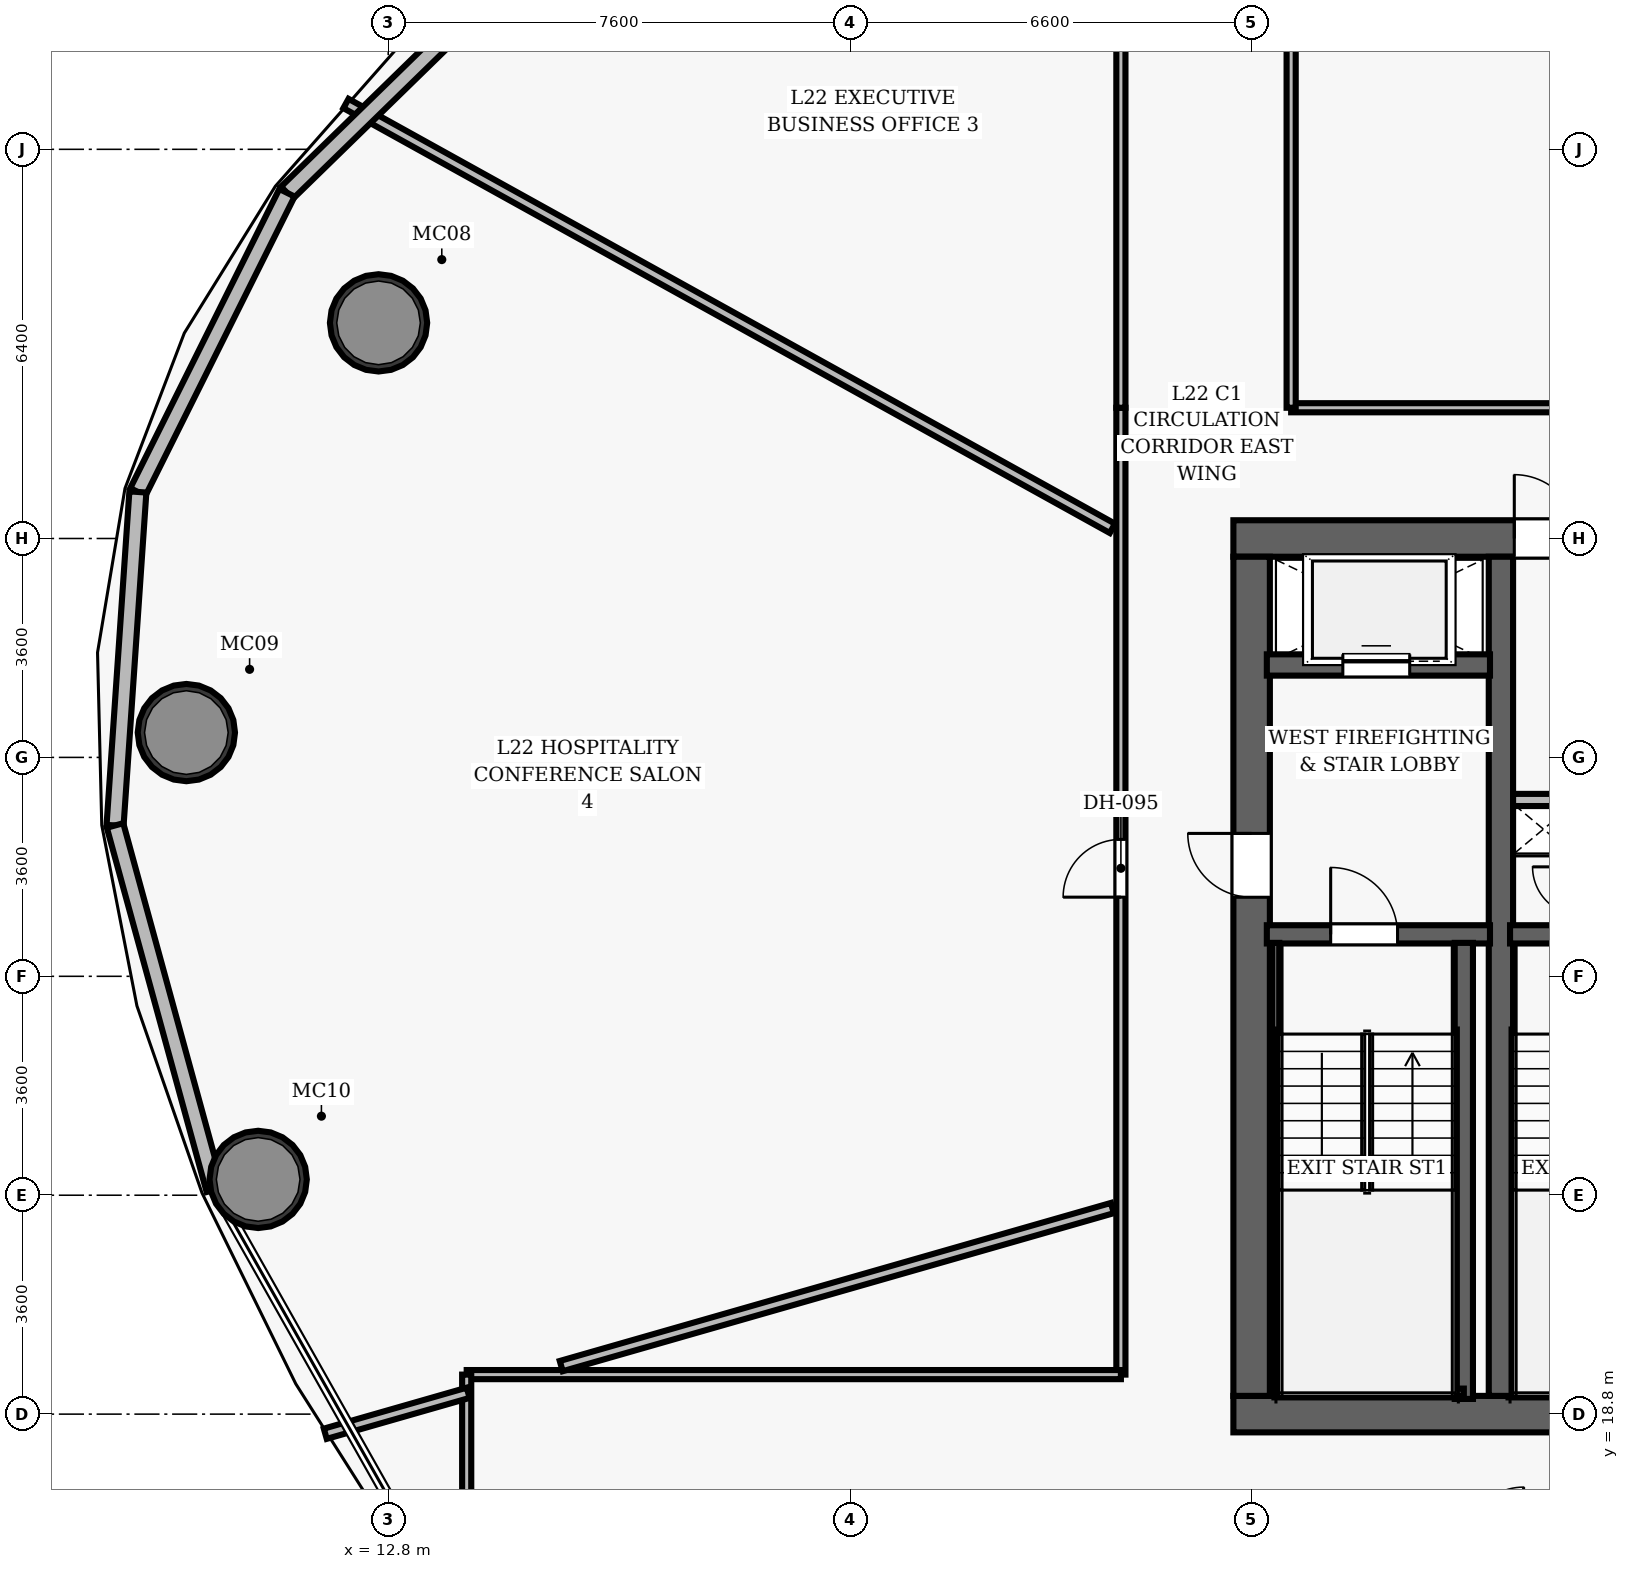
"""IFC4 building model, lengths in metres.
Left out: names, types, materials, properties, quantities, classifications, styles, units other than length and angle.
Written with IfcOpenShell. Run it as: python <this file> out.ifc"""

import sys

from ifc_helpers import new_model, si_unit, direction, frame, frame_2d, origin, origin_2d, place, context, subcontext, project, spatial, rectangle, hollow_circle, extrude, element, fill, save


model = new_model("IFC4")
c1 = context("Model", 3, precision=1e-05, world=origin(), true_north=direction((0.0, 1.0)))
c2 = subcontext(c1, "Body", "Model", "MODEL_VIEW")
j1 = project(units=[si_unit("LENGTHUNIT", "METRE"), si_unit("PLANEANGLEUNIT", "RADIAN")], contexts=[c1])
p1 = place(None, origin())
s1 = spatial("IfcSite", under=j1, at=p1, CompositionType="ELEMENT")
p2 = place(p1, origin())
s2 = spatial("IfcBuilding", under=s1, at=p2, CompositionType="ELEMENT")
p3 = place(p2, frame((0.0, 0.0, 93.9)))
s3 = spatial("IfcBuildingStorey", under=s2, at=p3, CompositionType="ELEMENT", Elevation=93.9)
p4 = place(p3, frame((26.7, 18.8, 0.0), z_axis=(0.0, 0.0, 1.0), x_axis=(1.0, 0.0, 0.0)))
e1 = element("IfcWall", 1, at=p4, inside=s3, PredefinedType="SHEAR", context=c2, shape_type="SweptSolid", body=[
    extrude(rectangle(XDim=22.6, YDim=0.6, at=frame_2d((11.3, 0.0))), origin(), (0.0, 0.0, 1.0), 3.5),
])
p5 = place(p4, frame((14.52, 0.0, 0.0)))
e2 = element("IfcOpeningElement", 2, at=p5, cuts=e1, PredefinedType="OPENING", context=c2, shape_type="SweptSolid", body=[
    extrude(rectangle(XDim=1.05, YDim=2.15, at=frame_2d((0.525, 1.075))), frame((0.0, 0.31, 0.0), z_axis=(0.0, -1.0, 0.0), x_axis=(1.0, 0.0, 0.0)), (0.0, 0.0, 1.0), 0.62),
])
p6 = place(p3, frame((26.7, 33.2, 0.0), z_axis=(0.0, 0.0, 1.0), x_axis=(1.0, 0.0, 0.0)))
e3 = element("IfcWall", 3, at=p6, inside=s3, PredefinedType="SHEAR", context=c2, shape_type="SweptSolid", body=[
    extrude(rectangle(XDim=22.6, YDim=0.6, at=frame_2d((11.3, 0.0))), origin(), (0.0, 0.0, 1.0), 3.5),
])
p7 = place(p6, frame((4.62, 0.0, 0.0)))
e4 = element("IfcOpeningElement", 4, at=p7, cuts=e3, PredefinedType="OPENING", context=c2, shape_type="SweptSolid", body=[
    extrude(rectangle(XDim=1.05, YDim=2.15, at=frame_2d((0.525, 1.075))), frame((0.0, 0.31, 0.0), z_axis=(0.0, -1.0, 0.0), x_axis=(1.0, 0.0, 0.0)), (0.0, 0.0, 1.0), 0.62),
])
p8 = place(p6, frame((14.52, 0.0, 0.0)))
e5 = element("IfcOpeningElement", 5, at=p8, cuts=e3, PredefinedType="OPENING", context=c2, shape_type="SweptSolid", body=[
    extrude(rectangle(XDim=1.05, YDim=2.15, at=frame_2d((0.525, 1.075))), frame((0.0, 0.31, 0.0), z_axis=(0.0, -1.0, 0.0), x_axis=(1.0, 0.0, 0.0)), (0.0, 0.0, 1.0), 0.62),
])
p9 = place(p3, frame((27.0, 19.1, 0.0), z_axis=(0.0, 0.0, 1.0), x_axis=(0.0, 1.0, 0.0)))
e6 = element("IfcWall", 6, at=p9, inside=s3, PredefinedType="SHEAR", context=c2, shape_type="SweptSolid", body=[
    extrude(rectangle(XDim=13.8, YDim=0.6, at=frame_2d((6.9, 0.0))), origin(), (0.0, 0.0, 1.0), 3.5),
])
p10 = place(p9, frame((8.2, 0.0, 0.0)))
e7 = element("IfcOpeningElement", 7, at=p10, cuts=e6, PredefinedType="OPENING", context=c2, shape_type="SweptSolid", body=[
    extrude(rectangle(XDim=1.05, YDim=2.15, at=frame_2d((0.525, 1.075))), frame((0.0, 0.31, 0.0), z_axis=(0.0, -1.0, 0.0), x_axis=(1.0, 0.0, 0.0)), (0.0, 0.0, 1.0), 0.62),
])
p11 = place(p3, frame((31.1, 19.1, 0.0), z_axis=(0.0, 0.0, 1.0), x_axis=(0.0, 1.0, 0.0)))
e8 = element("IfcWall", 8, at=p11, inside=s3, PredefinedType="SHEAR", context=c2, shape_type="SweptSolid", body=[
    extrude(rectangle(XDim=13.8, YDim=0.4, at=frame_2d((6.9, 0.0))), origin(), (0.0, 0.0, 1.0), 3.5),
])
for number, where, z_axis, x_axis in (
    (9, (12.641, 36.746, 0.0), (0.0, 0.0, 1.0), (1.0, 0.0, 0.0)),
    (10, (9.48, 30.008, 0.0), (0.0, 0.0, 1.0), (1.0, 0.0, 0.0)),
    (11, (10.661, 22.66, 0.0), (0.0, 0.0, 1.0), (1.0, 0.0, 0.0)),
):
    element("IfcColumn", number, at=place(p3, frame(where, z_axis=z_axis, x_axis=x_axis)), inside=s3, PredefinedType="COLUMN", context=c2, shape_type="SweptSolid", body=[
        extrude(hollow_circle(Radius=0.8, WallThickness=0.06, at=origin_2d()), origin(), (0.0, 0.0, 1.0), 3.5),
    ])
p12 = place(p3, frame((27.25, 26.69, 0.0), z_axis=(0.0, 0.0, 1.0), x_axis=(1.0, 0.0, 0.0)))
e12 = element("IfcWall", 12, at=p12, inside=s3, PredefinedType="SHEAR", context=c2, shape_type="SweptSolid", body=[
    extrude(rectangle(XDim=3.67, YDim=0.3, at=frame_2d((1.835, 0.0))), origin(), (0.0, 0.0, 1.0), 3.5),
])
p13 = place(p12, frame((1.05, 0.0, 0.0)))
e13 = element("IfcOpeningElement", 13, at=p13, cuts=e12, PredefinedType="OPENING", context=c2, shape_type="SweptSolid", body=[
    extrude(rectangle(XDim=1.1, YDim=2.15, at=frame_2d((0.55, 1.075))), frame((0.0, 0.16, 0.0), z_axis=(0.0, -1.0, 0.0), x_axis=(1.0, 0.0, 0.0)), (0.0, 0.0, 1.0), 0.32),
])
p14 = place(p3, frame((30.49, 19.05, 0.0), z_axis=(0.0, 0.0, 1.0), x_axis=(0.0, 1.0, 0.0)))
e14 = element("IfcWall", 14, at=p14, inside=s3, PredefinedType="SHEAR", context=c2, shape_type="SweptSolid", body=[
    extrude(rectangle(XDim=7.5, YDim=0.3, at=frame_2d((3.75, 0.0))), origin(), (0.0, 0.0, 1.0), 3.5),
])
p15 = place(p3, frame((27.395, 19.1, 0.0), z_axis=(0.0, 0.0, 1.0), x_axis=(0.0, 1.0, 0.0)))
e15 = element("IfcWall", 15, at=p15, inside=s3, PredefinedType="SHEAR", context=c2, shape_type="SweptSolid", body=[
    extrude(rectangle(XDim=7.45, YDim=0.12, at=frame_2d((3.725, 0.0))), origin(), (0.0, 0.0, 1.0), 3.5),
])
p16 = place(p3, frame((27.395, 19.16, 0.0), z_axis=(0.0, 0.0, 1.0), x_axis=(1.0, 0.0, 0.0)))
e16 = element("IfcWall", 16, at=p16, inside=s3, PredefinedType="SHEAR", context=c2, shape_type="SweptSolid", body=[
    extrude(rectangle(XDim=3.095, YDim=0.12, at=frame_2d((1.547, 0.0))), origin(), (0.0, 0.0, 1.0), 3.5),
])
p17 = place(p3, frame((27.25, 31.12, 0.0), z_axis=(0.0, 0.0, 1.0), x_axis=(1.0, 0.0, 0.0)))
e17 = element("IfcWall", 17, at=p17, inside=s3, PredefinedType="SHEAR", context=c2, shape_type="SweptSolid", body=[
    extrude(rectangle(XDim=3.67, YDim=0.35, at=frame_2d((1.835, 0.0))), origin(), (0.0, 0.0, 1.0), 2.5),
])
p18 = place(p17, frame((1.25, 0.0, 0.0)))
e18 = element("IfcOpeningElement", 18, at=p18, cuts=e17, PredefinedType="OPENING", context=c2, shape_type="SweptSolid", body=[
    extrude(rectangle(XDim=1.1, YDim=2.15, at=frame_2d((0.55, 1.075))), frame((0.0, 0.185, 0.0), z_axis=(0.0, -1.0, 0.0), x_axis=(1.0, 0.0, 0.0)), (0.0, 0.0, 1.0), 0.37),
])
p19 = place(p3, frame((31.25, 26.69, 0.0), z_axis=(0.0, 0.0, 1.0), x_axis=(1.0, 0.0, 0.0)))
e19 = element("IfcWall", 19, at=p19, inside=s3, PredefinedType="SHEAR", context=c2, shape_type="SweptSolid", body=[
    extrude(rectangle(XDim=3.56, YDim=0.3, at=frame_2d((1.78, 0.0))), origin(), (0.0, 0.0, 1.0), 3.5),
])
p20 = place(p19, frame((1.55, 0.0, 0.0)))
e20 = element("IfcOpeningElement", 20, at=p20, cuts=e19, PredefinedType="OPENING", context=c2, shape_type="SweptSolid", body=[
    extrude(rectangle(XDim=1.1, YDim=2.15, at=frame_2d((0.55, 1.075))), frame((0.0, 0.16, 0.0), z_axis=(0.0, -1.0, 0.0), x_axis=(1.0, 0.0, 0.0)), (0.0, 0.0, 1.0), 0.32),
])
p21 = place(p3, frame((31.3, 19.16, 0.0), z_axis=(0.0, 0.0, 1.0), x_axis=(1.0, 0.0, 0.0)))
e21 = element("IfcWall", 21, at=p21, inside=s3, PredefinedType="SHEAR", context=c2, shape_type="SweptSolid", body=[
    extrude(rectangle(XDim=3.04, YDim=0.12, at=frame_2d((1.52, 0.0))), origin(), (0.0, 0.0, 1.0), 3.5),
])
p22 = place(p3, frame((31.3, 28.9, 0.0), z_axis=(0.0, 0.0, 1.0), x_axis=(1.0, 0.0, 0.0)))
e22 = element("IfcWall", 22, at=p22, inside=s3, PredefinedType="PARTITIONING", context=c2, shape_type="SweptSolid", body=[
    extrude(rectangle(XDim=1.12, YDim=0.2, at=frame_2d((0.56, 0.0))), origin(), (0.0, 0.0, 1.0), 2.5),
])
p23 = place(p3, frame((27.65, 35.35, 0.0), z_axis=(0.0, 0.0, 1.0), x_axis=(1.0, 0.0, 0.0)))
e23 = element("IfcWall", 23, at=p23, inside=s3, PredefinedType="PARTITIONING", context=c2, shape_type="SweptSolid", body=[
    extrude(rectangle(XDim=23.5, YDim=0.15, at=frame_2d((11.75, 0.0))), origin(), (0.0, 0.0, 1.0), 2.5),
])
p24 = place(p23, frame((16.877, 0.0, 0.0)))
e24 = element("IfcOpeningElement", 24, at=p24, cuts=e23, PredefinedType="OPENING", context=c2, shape_type="SweptSolid", body=[
    extrude(rectangle(XDim=0.95, YDim=2.15, at=frame_2d((0.475, 1.075))), frame((0.0, 0.085, 0.0), z_axis=(0.0, -1.0, 0.0), x_axis=(1.0, 0.0, 0.0)), (0.0, 0.0, 1.0), 0.17),
])
p25 = place(p23, frame((9.003, 0.0, 0.0)))
e25 = element("IfcOpeningElement", 25, at=p25, cuts=e23, PredefinedType="OPENING", context=c2, shape_type="SweptSolid", body=[
    extrude(rectangle(XDim=0.95, YDim=2.15, at=frame_2d((0.475, 1.075))), frame((0.0, 0.085, 0.0), z_axis=(0.0, -1.0, 0.0), x_axis=(1.0, 0.0, 0.0)), (0.0, 0.0, 1.0), 0.17),
])
p26 = place(p23, frame((5.473, 0.0, 0.0)))
e26 = element("IfcOpeningElement", 26, at=p26, cuts=e23, PredefinedType="OPENING", context=c2, shape_type="SweptSolid", body=[
    extrude(rectangle(XDim=0.95, YDim=2.15, at=frame_2d((0.475, 1.075))), frame((0.0, 0.085, 0.0), z_axis=(0.0, -1.0, 0.0), x_axis=(1.0, 0.0, 0.0)), (0.0, 0.0, 1.0), 0.17),
])
p27 = place(p3, frame((24.85, 19.45, 0.0), z_axis=(0.0, 0.0, 1.0), x_axis=(0.0, 1.0, 0.0)))
e27 = element("IfcWall", 27, at=p27, inside=s3, PredefinedType="PARTITIONING", context=c2, shape_type="SweptSolid", body=[
    extrude(rectangle(XDim=15.9, YDim=0.15, at=frame_2d((7.95, 0.0))), origin(), (0.0, 0.0, 1.0), 2.5),
])
p28 = place(p27, frame((7.852, 0.0, 0.0)))
e28 = element("IfcOpeningElement", 28, at=p28, cuts=e27, PredefinedType="OPENING", context=c2, shape_type="SweptSolid", body=[
    extrude(rectangle(XDim=0.95, YDim=2.15, at=frame_2d((0.475, 1.075))), frame((0.0, 0.085, 0.0), z_axis=(0.0, -1.0, 0.0), x_axis=(1.0, 0.0, 0.0)), (0.0, 0.0, 1.0), 0.17),
])
p29 = place(p3, frame((14.091, 19.45, 0.0), z_axis=(0.0, 0.0, 1.0), x_axis=(1.0, 0.0, 0.0)))
e29 = element("IfcWall", 29, at=p29, inside=s3, PredefinedType="PARTITIONING", context=c2, shape_type="SweptSolid", body=[
    extrude(rectangle(XDim=10.759, YDim=0.15, at=frame_2d((5.38, 0.0))), origin(), (0.0, 0.0, 1.0), 2.5),
])
p30 = place(p3, frame((14.091, 16.65, 0.0), z_axis=(0.0, 0.0, 1.0), x_axis=(0.0, 1.0, 0.0)))
e30 = element("IfcWall", 30, at=p30, inside=s3, PredefinedType="PARTITIONING", context=c2, shape_type="SweptSolid", body=[
    extrude(rectangle(XDim=2.8, YDim=0.15, at=frame_2d((1.4, 0.0))), origin(), (0.0, 0.0, 1.0), 2.5),
])
for number, where, z_axis, x_axis in (
    (31, (24.85, 35.35, 0.0), (0.0, 0.0, 1.0), (0.0, 1.0, 0.0)),
    (32, (27.65, 35.35, 0.0), (0.0, 0.0, 1.0), (0.0, 1.0, 0.0)),
):
    element("IfcWall", number, at=place(p3, frame(where, z_axis=z_axis, x_axis=x_axis)), inside=s3, PredefinedType="PARTITIONING", context=c2, shape_type="SweptSolid", body=[
        extrude(rectangle(XDim=10.15, YDim=0.15, at=frame_2d((5.075, 0.0))), origin(), (0.0, 0.0, 1.0), 2.5),
    ])
p31 = place(p3, frame((35.279, 35.49, 0.0), z_axis=(0.0, 0.0, 1.0), x_axis=(-0.27563986981, 0.961260975059, 0.0)))
e33 = element("IfcWall", 33, at=p31, inside=s3, PredefinedType="PARTITIONING", context=c2, shape_type="SweptSolid", body=[
    extrude(rectangle(XDim=14.949, YDim=0.175, at=frame_2d((7.475, 0.0))), origin(), (0.0, 0.0, 1.0), 2.5),
])
p32 = place(p3, frame((24.71, 33.367, 0.0), z_axis=(0.0, 0.0, 1.0), x_axis=(-0.874619537092, 0.48480992702, 0.0)))
e34 = element("IfcWall", 34, at=p32, inside=s3, PredefinedType="PARTITIONING", context=c2, shape_type="SweptSolid", body=[
    extrude(rectangle(XDim=14.412, YDim=0.175, at=frame_2d((7.206, 0.0))), origin(), (0.0, 0.0, 1.0), 2.5),
])
p33 = place(p3, frame((24.71, 22.189, 0.0), z_axis=(0.0, 0.0, 1.0), x_axis=(-0.961261668066, -0.275637453019, 0.0)))
e35 = element("IfcWall", 35, at=p33, inside=s3, PredefinedType="PARTITIONING", context=c2, shape_type="SweptSolid", body=[
    extrude(rectangle(XDim=9.429, YDim=0.175, at=frame_2d((4.715, 0.0))), origin(), (0.0, 0.0, 1.0), 2.5),
])
p34 = place(p3, frame((14.115, 19.151, 0.0), z_axis=(0.0, 0.0, 1.0), x_axis=(-0.961267280853, -0.275617878159, 0.0)))
e36 = element("IfcWall", 36, at=p34, inside=s3, PredefinedType="PARTITIONING", context=c2, shape_type="SweptSolid", body=[
    extrude(rectangle(XDim=2.445, YDim=0.175, at=frame_2d((1.222, 0.0))), origin(), (0.0, 0.0, 1.0), 2.5),
])
p35 = place(p3, frame((11.135, 38.885, 0.0), z_axis=(0.0, 0.0, 1.0), x_axis=(0.715932856162, 0.698169138152, 0.0)))
e37 = element("IfcWall", 37, at=p35, inside=s3, PredefinedType="SOLIDWALL", context=c2, shape_type="SweptSolid", body=[
    extrude(rectangle(XDim=6.212, YDim=0.28, at=frame_2d((3.106, 0.0))), origin(), (0.0, 0.0, 1.0), 3.15),
])
p36 = place(p3, frame((8.683, 33.965, 0.0), z_axis=(0.0, 0.0, 1.0), x_axis=(0.446022975925, 0.895021510885, 0.0)))
e38 = element("IfcWall", 38, at=p36, inside=s3, PredefinedType="SOLIDWALL", context=c2, shape_type="SweptSolid", body=[
    extrude(rectangle(XDim=5.497, YDim=0.28, at=frame_2d((2.749, 0.0))), origin(), (0.0, 0.0, 1.0), 3.15),
])
p37 = place(p3, frame((8.308, 28.481, 0.0), z_axis=(0.0, 0.0, 1.0), x_axis=(0.068257968515, 0.997667705067, 0.0)))
e39 = element("IfcWall", 39, at=p37, inside=s3, PredefinedType="SOLIDWALL", context=c2, shape_type="SweptSolid", body=[
    extrude(rectangle(XDim=5.498, YDim=0.28, at=frame_2d((2.749, 0.0))), origin(), (0.0, 0.0, 1.0), 3.15),
])
p38 = place(p3, frame((9.949, 22.49, 0.0), z_axis=(0.0, 0.0, 1.0), x_axis=(-0.264261187707, 0.96445115204, 0.0)))
e40 = element("IfcWall", 40, at=p38, inside=s3, PredefinedType="SOLIDWALL", context=c2, shape_type="SweptSolid", body=[
    extrude(rectangle(XDim=6.212, YDim=0.28, at=frame_2d((3.106, 0.0))), origin(), (0.0, 0.0, 1.0), 3.15),
])
p39 = place(p13, origin())
e41 = element("IfcDoor", 41, at=p39, inside=s3, OperationType="SINGLE_SWING_LEFT", PredefinedType="DOOR", context=c2, shape_type="SweptSolid", body=[
    extrude(rectangle(XDim=1.1, YDim=2.15, at=frame_2d((0.55, 1.075))), frame((0.0, 0.025, 0.0), z_axis=(0.0, -1.0, 0.0), x_axis=(1.0, 0.0, 0.0)), (0.0, 0.0, 1.0), 0.05),
])
fill(e13, e41)
p40 = place(p10, origin())
e42 = element("IfcDoor", 42, at=p40, inside=s3, OperationType="SINGLE_SWING_RIGHT", PredefinedType="DOOR", context=c2, shape_type="SweptSolid", body=[
    extrude(rectangle(XDim=1.05, YDim=2.15, at=frame_2d((0.525, 1.075))), frame((0.0, 0.025, 0.0), z_axis=(0.0, -1.0, 0.0), x_axis=(1.0, 0.0, 0.0)), (0.0, 0.0, 1.0), 0.05),
])
fill(e7, e42)
p41 = place(p7, origin())
e43 = element("IfcDoor", 43, at=p41, inside=s3, OperationType="SINGLE_SWING_LEFT", PredefinedType="DOOR", context=c2, shape_type="SweptSolid", body=[
    extrude(rectangle(XDim=1.05, YDim=2.15, at=frame_2d((0.525, 1.075))), frame((0.0, 0.025, 0.0), z_axis=(0.0, -1.0, 0.0), x_axis=(1.0, 0.0, 0.0)), (0.0, 0.0, 1.0), 0.05),
])
fill(e4, e43)
p42 = place(p28, origin())
e44 = element("IfcDoor", 44, at=p42, inside=s3, OperationType="SINGLE_SWING_LEFT", PredefinedType="DOOR", context=c2, shape_type="SweptSolid", body=[
    extrude(rectangle(XDim=0.95, YDim=2.15, at=frame_2d((0.475, 1.075))), frame((0.0, 0.025, 0.0), z_axis=(0.0, -1.0, 0.0), x_axis=(1.0, 0.0, 0.0)), (0.0, 0.0, 1.0), 0.05),
])
fill(e28, e44)
p43 = place(p18, origin())
e45 = element("IfcDoor", 45, at=p43, inside=s3, OperationType="SLIDING_TO_LEFT", PredefinedType="DOOR", context=c2, shape_type="SweptSolid", body=[
    extrude(rectangle(XDim=1.1, YDim=2.15, at=frame_2d((0.55, 1.075))), frame((0.0, 0.025, 0.0), z_axis=(0.0, -1.0, 0.0), x_axis=(1.0, 0.0, 0.0)), (0.0, 0.0, 1.0), 0.05),
])
fill(e18, e45)
save(model, sys.argv[1])
